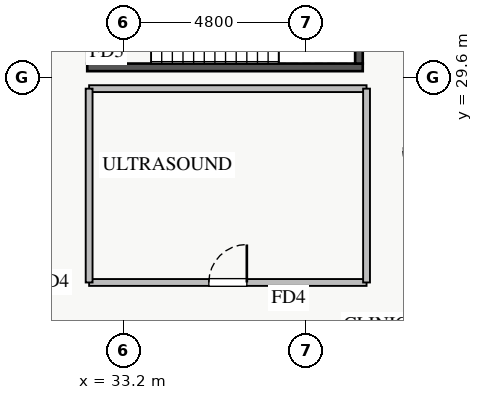
"""IFC4 building model, lengths in metres.
Left out: names, types, materials, properties, quantities, classifications, styles, units other than length and angle.
Written with IfcOpenShell. Run it as: python <this file> out.ifc"""

import sys

from ifc_helpers import new_model, si_unit, direction, frame, frame_2d, origin, place, context, subcontext, project, spatial, rectangle, extrude, source, transform, mapped, element, fill, save


model = new_model("IFC4")
c1 = context("Model", 3, precision=1e-05, world=origin(), true_north=direction((0.0, 1.0)))
c2 = subcontext(c1, "Body", "Model", "MODEL_VIEW")
j1 = project(units=[si_unit("LENGTHUNIT", "METRE"), si_unit("PLANEANGLEUNIT", "RADIAN")], contexts=[c1])
p1 = place(None, origin())
s1 = spatial("IfcSite", under=j1, at=p1, CompositionType="ELEMENT")
p2 = place(p1, origin())
s2 = spatial("IfcBuilding", under=s1, at=p2, CompositionType="ELEMENT")
p3 = place(p2, frame((0.0, 0.0, 9.4)))
s3 = spatial("IfcBuildingStorey", under=s2, at=p3, CompositionType="ELEMENT", Elevation=9.4)
p4 = place(p3, frame((32.25, 29.86, 0.0), z_axis=(0.0, 0.0, 1.0), x_axis=(1.0, 0.0, 0.0)))
e1 = element("IfcWall", 1, at=p4, inside=s3, PredefinedType="SHEAR", context=c2, shape_type="SweptSolid", body=[
    extrude(rectangle(XDim=7.25, YDim=0.2, at=frame_2d((3.625, 0.0))), origin(), (0.0, 0.0, 1.0), 4.4),
])
p5 = place(p3, frame((32.35, 29.96, 0.0), z_axis=(0.0, 0.0, 1.0), x_axis=(0.0, 1.0, 0.0)))
e2 = element("IfcWall", 2, at=p5, inside=s3, PredefinedType="SHEAR", context=c2, shape_type="SweptSolid", body=[
    extrude(rectangle(XDim=3.04, YDim=0.2, at=frame_2d((1.52, 0.0))), origin(), (0.0, 0.0, 1.0), 4.4),
])
p6 = place(p5, frame((0.95, 0.0, 0.0)))
e3 = element("IfcOpeningElement", 3, at=p6, cuts=e2, PredefinedType="OPENING", context=c2, shape_type="SweptSolid", body=[
    extrude(rectangle(XDim=1.1, YDim=2.05, at=frame_2d((0.55, 1.025))), frame((0.0, 0.11, 0.0), z_axis=(0.0, -1.0, 0.0), x_axis=(1.0, 0.0, 0.0)), (0.0, 0.0, 1.0), 0.22),
])
p7 = place(p3, frame((39.4, 29.96, 0.0), z_axis=(0.0, 0.0, 1.0), x_axis=(0.0, 1.0, 0.0)))
e4 = element("IfcWall", 4, at=p7, inside=s3, PredefinedType="SHEAR", context=c2, shape_type="SweptSolid", body=[
    extrude(rectangle(XDim=3.04, YDim=0.2, at=frame_2d((1.52, 0.0))), origin(), (0.0, 0.0, 1.0), 4.4),
])
p8 = place(p3, frame((32.3, 24.2, 0.0), z_axis=(0.0, 0.0, 1.0), x_axis=(1.0, 0.0, 0.0)))
e5 = element("IfcWall", 5, at=p8, inside=s3, PredefinedType="PARTITIONING", context=c2, shape_type="SweptSolid", body=[
    extrude(rectangle(XDim=7.3, YDim=0.18, at=frame_2d((3.65, 0.0))), origin(), (0.0, 0.0, 1.0), 4.18),
])
p9 = place(p8, frame((3.15, 0.0, 0.0)))
e6 = element("IfcOpeningElement", 6, at=p9, cuts=e5, PredefinedType="OPENING", context=c2, shape_type="SweptSolid", body=[
    extrude(rectangle(XDim=1.0, YDim=2.05, at=frame_2d((0.5, 1.025))), frame((0.0, 0.1, 0.0), z_axis=(0.0, -1.0, 0.0), x_axis=(1.0, 0.0, 0.0)), (0.0, 0.0, 1.0), 0.2),
])
p10 = place(p3, frame((32.3, 29.3, 0.0), z_axis=(0.0, 0.0, 1.0), x_axis=(1.0, 0.0, 0.0)))
e7 = element("IfcWall", 7, at=p10, inside=s3, PredefinedType="PARTITIONING", context=c2, shape_type="SweptSolid", body=[
    extrude(rectangle(XDim=7.3, YDim=0.18, at=frame_2d((3.65, 0.0))), origin(), (0.0, 0.0, 1.0), 3.475),
])
for number, where, z_axis, x_axis in (
    (8, (32.3, 24.2, 0.0), (0.0, 0.0, 1.0), (0.0, 1.0, 0.0)),
    (9, (39.6, 24.2, 0.0), (0.0, 0.0, 1.0), (0.0, 1.0, 0.0)),
):
    element("IfcWall", number, at=place(p3, frame(where, z_axis=z_axis, x_axis=x_axis)), inside=s3, PredefinedType="PARTITIONING", context=c2, shape_type="SweptSolid", body=[
        extrude(rectangle(XDim=5.1, YDim=0.18, at=frame_2d((2.55, 0.0))), origin(), (0.0, 0.0, 1.0), 4.18),
    ])
m1 = source(origin(), c2, "Body", "SweptSolid", [
    extrude(rectangle(XDim=1.0, YDim=2.05, at=frame_2d((0.5, 1.025))), frame((0.0, 0.025, 0.0), z_axis=(0.0, -1.0, 0.0), x_axis=(1.0, 0.0, 0.0)), (0.0, 0.0, 1.0), 0.05),
])
p11 = place(p9, origin())
e10 = element("IfcDoor", 10, at=p11, inside=s3, OperationType="SINGLE_SWING_RIGHT", PredefinedType="DOOR", context=c2, shape_type="MappedRepresentation", body=[
    mapped(m1, transform((0.0, 0.0, 0.0), x_axis=(1.0, 0.0, 0.0), y_axis=(0.0, 1.0, 0.0), z_axis=(0.0, 0.0, 1.0), scale=1.0)),
])
fill(e6, e10)
save(model, sys.argv[1])
